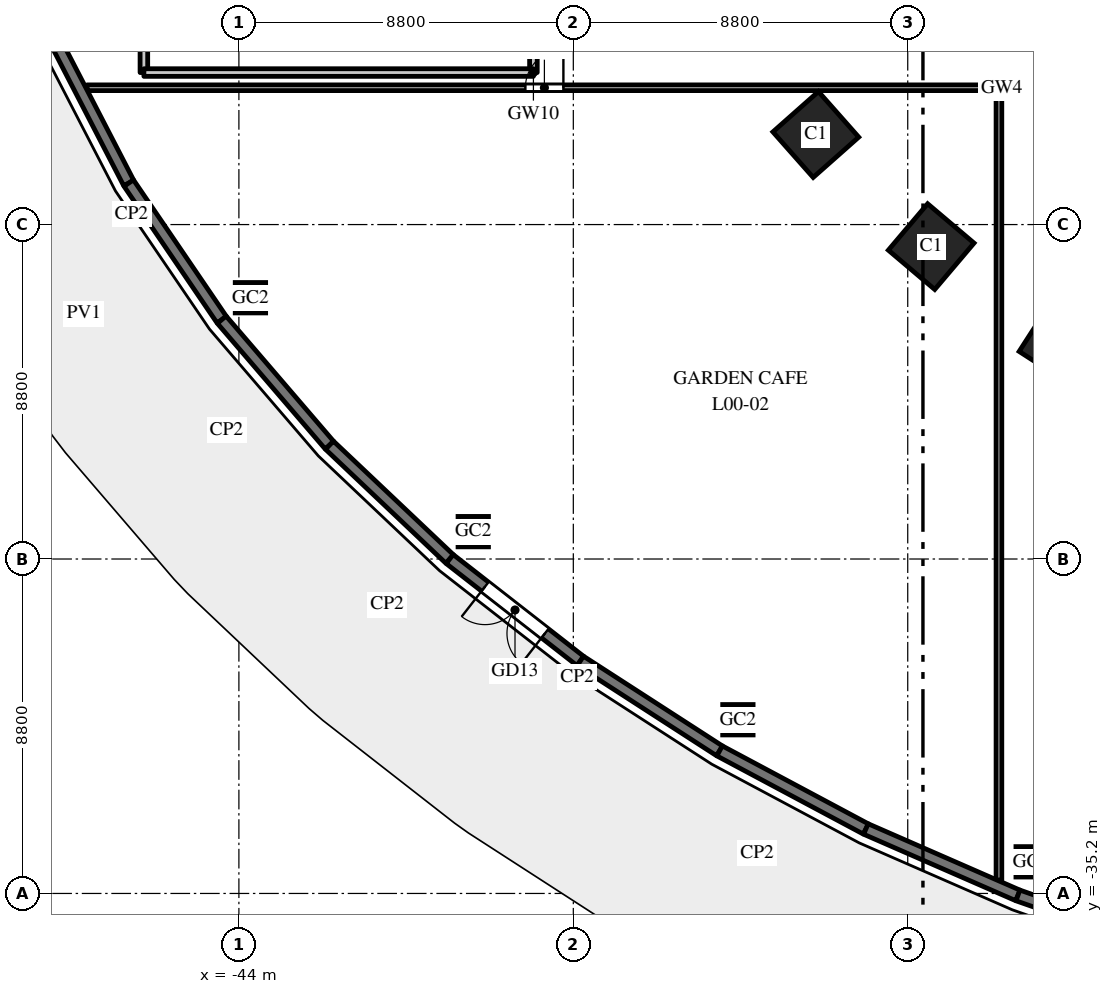
"""IFC4 building model, lengths in metres.
Left out: names, types, materials, properties, quantities, classifications, styles, units other than length and angle.
Written with IfcOpenShell. Run it as: python <this file> out.ifc"""

import sys

from ifc_helpers import new_model, si_unit, direction, frame, frame_2d, origin, origin_2d, place, context, subcontext, project, spatial, rectangle, hollow_rectangle, i_section, extrude, element, fill, save


model = new_model("IFC4")
c1 = context("Model", 3, precision=1e-05, world=origin(), true_north=direction((0.0, 1.0)))
c2 = subcontext(c1, "Body", "Model", "MODEL_VIEW")
j1 = project(units=[si_unit("LENGTHUNIT", "METRE"), si_unit("PLANEANGLEUNIT", "RADIAN")], contexts=[c1])
p1 = place(None, origin())
s1 = spatial("IfcSite", under=j1, at=p1, CompositionType="ELEMENT")
p2 = place(p1, origin())
s2 = spatial("IfcBuilding", under=s1, at=p2, CompositionType="ELEMENT")
p3 = place(p2, origin())
s3 = spatial("IfcBuildingStorey", under=s2, at=p3, CompositionType="ELEMENT", Elevation=0.0)
for number, where, z_axis, x_axis in (
    (1, (-28.819, -15.23, 0.0), (0.0, 0.0, 1.0), (0.663, -0.749, 0.0)),
    (2, (-25.783, -18.18, 0.0), (0.0, 0.0, 1.0), (0.763, -0.646, 0.0)),
    (3, (-22.362, -20.7, 0.0), (0.0, 0.0, 1.0), (0.84, -0.542, 0.0)),
):
    element("IfcColumn", number, at=place(p3, frame(where, z_axis=z_axis, x_axis=x_axis)), inside=s3, PredefinedType="COLUMN", context=c2, shape_type="SweptSolid", body=[
        extrude(rectangle(XDim=1.6, YDim=1.6, at=origin_2d()), origin(), (0.0, 0.0, 1.0), 7.5),
    ])
for number, where, z_axis, x_axis in (
    (4, (-43.696, -19.525, 0.0), (0.0, 0.0, 1.0), (1.0, 0.0, 0.0)),
    (5, (-37.833, -25.68, 0.0), (0.0, 0.0, 1.0), (1.0, 0.0, 0.0)),
    (6, (-30.869, -30.629, 0.0), (0.0, 0.0, 1.0), (1.0, 0.0, 0.0)),
    (7, (-23.153, -34.368, 0.0), (0.0, 0.0, 1.0), (1.0, 0.0, 0.0)),
):
    element("IfcColumn", number, at=place(p3, frame(where, z_axis=z_axis, x_axis=x_axis)), inside=s3, PredefinedType="COLUMN", context=c2, shape_type="SweptSolid", body=[
        extrude(hollow_rectangle(XDim=0.8, YDim=0.8, WallThickness=0.04, at=origin_2d()), origin(), (0.0, 0.0, 1.0), 7.5),
    ])
p4 = place(p3, frame((-47.997, -14.0, 0.0), z_axis=(0.0, 0.0, 1.0), x_axis=(1.0, 0.0, 0.0)))
e8 = element("IfcWall", 8, at=p4, inside=s3, PredefinedType="PARTITIONING", context=c2, shape_type="SweptSolid", body=[
    extrude(rectangle(XDim=24.072, YDim=0.15, at=frame_2d((12.036, 0.0))), origin(), (0.0, 0.0, 1.0), 6.25),
])
p5 = place(p4, frame((11.536, 0.0, 0.0)))
e9 = element("IfcOpeningElement", 9, at=p5, cuts=e8, PredefinedType="OPENING", context=c2, shape_type="SweptSolid", body=[
    extrude(rectangle(XDim=1.0, YDim=2.1, at=frame_2d((0.5, 1.05))), frame((0.0, 0.085, 0.0), z_axis=(0.0, -1.0, 0.0), x_axis=(1.0, 0.0, 0.0)), (0.0, 0.0, 1.0), 0.17),
])
p6 = place(p3, frame((-24.0, -14.075, 0.0), z_axis=(0.0, 0.0, 1.0), x_axis=(0.0, -1.0, 0.0)))
e10 = element("IfcWall", 10, at=p6, inside=s3, PredefinedType="PARTITIONING", context=c2, shape_type="SweptSolid", body=[
    extrude(rectangle(XDim=20.776, YDim=0.15, at=frame_2d((10.388, 0.0))), origin(), (0.0, 0.0, 1.0), 6.2),
])
p7 = place(p3, frame((-48.894, -12.649, 0.0), z_axis=(0.0, 0.0, 1.0), x_axis=(0.459242531468, -0.888310923771, 0.0)))
e11 = element("IfcWall", 11, at=p7, inside=s3, PredefinedType="SOLIDWALL", context=c2, shape_type="SweptSolid", body=[
    extrude(rectangle(XDim=4.345, YDim=0.3, at=frame_2d((2.172, 0.0))), origin(), (0.0, 0.0, 1.0), 7.25),
])
p8 = place(p7, frame((0.673, 0.0, 0.0)))
e12 = element("IfcOpeningElement", 12, at=p8, cuts=e11, PredefinedType="OPENING", context=c2, shape_type="SweptSolid", body=[
    extrude(rectangle(XDim=3.0, YDim=3.6, at=frame_2d((1.5, 1.8))), frame((0.0, 0.16, 0.0), z_axis=(0.0, -1.0, 0.0), x_axis=(1.0, 0.0, 0.0)), (0.0, 0.0, 1.0), 0.32),
])
p9 = place(p3, frame((-46.899, -16.508, 0.0), z_axis=(0.0, 0.0, 1.0), x_axis=(0.562667738859, -0.82668314102, 0.0)))
e13 = element("IfcWall", 13, at=p9, inside=s3, PredefinedType="SOLIDWALL", context=c2, shape_type="SweptSolid", body=[
    extrude(rectangle(XDim=4.349, YDim=0.3, at=frame_2d((2.174, 0.0))), origin(), (0.0, 0.0, 1.0), 7.25),
])
p10 = place(p9, frame((0.674, 0.0, 0.0)))
e14 = element("IfcOpeningElement", 14, at=p10, cuts=e13, PredefinedType="OPENING", context=c2, shape_type="SweptSolid", body=[
    extrude(rectangle(XDim=3.0, YDim=3.6, at=frame_2d((1.5, 1.8))), frame((0.0, 0.16, 0.0), z_axis=(0.0, -1.0, 0.0), x_axis=(1.0, 0.0, 0.0)), (0.0, 0.0, 1.0), 0.32),
])
p11 = place(p3, frame((-44.452, -20.104, 0.0), z_axis=(0.0, 0.0, 1.0), x_axis=(0.651387059497, -0.758745608699, 0.0)))
e15 = element("IfcWall", 15, at=p11, inside=s3, PredefinedType="SOLIDWALL", context=c2, shape_type="SweptSolid", body=[
    extrude(rectangle(XDim=4.353, YDim=0.3, at=frame_2d((2.176, 0.0))), origin(), (0.0, 0.0, 1.0), 7.25),
])
p12 = place(p11, frame((0.676, 0.0, 0.0)))
e16 = element("IfcOpeningElement", 16, at=p12, cuts=e15, PredefinedType="OPENING", context=c2, shape_type="SweptSolid", body=[
    extrude(rectangle(XDim=3.0, YDim=3.6, at=frame_2d((1.5, 1.8))), frame((0.0, 0.16, 0.0), z_axis=(0.0, -1.0, 0.0), x_axis=(1.0, 0.0, 0.0)), (0.0, 0.0, 1.0), 0.32),
])
p13 = place(p3, frame((-41.617, -23.406, 0.0), z_axis=(0.0, 0.0, 1.0), x_axis=(0.72620446032, -0.687478786444, 0.0)))
e17 = element("IfcWall", 17, at=p13, inside=s3, PredefinedType="SOLIDWALL", context=c2, shape_type="SweptSolid", body=[
    extrude(rectangle(XDim=4.356, YDim=0.3, at=frame_2d((2.178, 0.0))), origin(), (0.0, 0.0, 1.0), 7.25),
])
p14 = place(p13, frame((0.678, 0.0, 0.0)))
e18 = element("IfcOpeningElement", 18, at=p14, cuts=e17, PredefinedType="OPENING", context=c2, shape_type="SweptSolid", body=[
    extrude(rectangle(XDim=3.0, YDim=3.6, at=frame_2d((1.5, 1.8))), frame((0.0, 0.16, 0.0), z_axis=(0.0, -1.0, 0.0), x_axis=(1.0, 0.0, 0.0)), (0.0, 0.0, 1.0), 0.32),
])
p15 = place(p3, frame((-38.453, -26.401, 0.0), z_axis=(0.0, 0.0, 1.0), x_axis=(0.788491985196, -0.615045030288, 0.0)))
e19 = element("IfcWall", 19, at=p15, inside=s3, PredefinedType="SOLIDWALL", context=c2, shape_type="SweptSolid", body=[
    extrude(rectangle(XDim=4.359, YDim=0.3, at=frame_2d((2.18, 0.0))), origin(), (0.0, 0.0, 1.0), 7.25),
])
p16 = place(p15, frame((1.18, 0.0, 0.0)))
e20 = element("IfcOpeningElement", 20, at=p16, cuts=e19, PredefinedType="OPENING", context=c2, shape_type="SweptSolid", body=[
    extrude(rectangle(XDim=2.0, YDim=2.4, at=frame_2d((1.0, 1.2))), frame((0.0, 0.16, 0.0), z_axis=(0.0, -1.0, 0.0), x_axis=(1.0, 0.0, 0.0)), (0.0, 0.0, 1.0), 0.32),
])
p17 = place(p3, frame((-35.016, -29.082, 0.0), z_axis=(0.0, 0.0, 1.0), x_axis=(0.840047348843, -0.542513088969, 0.0)))
e21 = element("IfcWall", 21, at=p17, inside=s3, PredefinedType="SOLIDWALL", context=c2, shape_type="SweptSolid", body=[
    extrude(rectangle(XDim=4.362, YDim=0.3, at=frame_2d((2.181, 0.0))), origin(), (0.0, 0.0, 1.0), 7.25),
])
p18 = place(p17, frame((0.681, 0.0, 0.0)))
e22 = element("IfcOpeningElement", 22, at=p18, cuts=e21, PredefinedType="OPENING", context=c2, shape_type="SweptSolid", body=[
    extrude(rectangle(XDim=3.0, YDim=3.6, at=frame_2d((1.5, 1.8))), frame((0.0, 0.16, 0.0), z_axis=(0.0, -1.0, 0.0), x_axis=(1.0, 0.0, 0.0)), (0.0, 0.0, 1.0), 0.32),
])
p19 = place(p3, frame((-31.352, -31.448, 0.0), z_axis=(0.0, 0.0, 1.0), x_axis=(0.882159305704, -0.47095112205, 0.0)))
e23 = element("IfcWall", 23, at=p19, inside=s3, PredefinedType="SOLIDWALL", context=c2, shape_type="SweptSolid", body=[
    extrude(rectangle(XDim=4.365, YDim=0.3, at=frame_2d((2.182, 0.0))), origin(), (0.0, 0.0, 1.0), 7.25),
])
p20 = place(p19, frame((0.682, 0.0, 0.0)))
e24 = element("IfcOpeningElement", 24, at=p20, cuts=e23, PredefinedType="OPENING", context=c2, shape_type="SweptSolid", body=[
    extrude(rectangle(XDim=3.0, YDim=3.6, at=frame_2d((1.5, 1.8))), frame((0.0, 0.16, 0.0), z_axis=(0.0, -1.0, 0.0), x_axis=(1.0, 0.0, 0.0)), (0.0, 0.0, 1.0), 0.32),
])
p21 = place(p3, frame((-27.501, -33.504, 0.0), z_axis=(0.0, 0.0, 1.0), x_axis=(0.916336904548, -0.400408138483, 0.0)))
e25 = element("IfcWall", 25, at=p21, inside=s3, PredefinedType="SOLIDWALL", context=c2, shape_type="SweptSolid", body=[
    extrude(rectangle(XDim=4.366, YDim=0.3, at=frame_2d((2.183, 0.0))), origin(), (0.0, 0.0, 1.0), 7.25),
])
p22 = place(p21, frame((0.563, 0.0, 0.0)))
e26 = element("IfcOpeningElement", 26, at=p22, cuts=e25, PredefinedType="OPENING", context=c2, shape_type="SweptSolid", body=[
    extrude(rectangle(XDim=3.0, YDim=3.6, at=frame_2d((1.5, 1.8))), frame((0.0, 0.16, 0.0), z_axis=(0.0, -1.0, 0.0), x_axis=(1.0, 0.0, 0.0)), (0.0, 0.0, 1.0), 0.32),
])
p23 = place(p3, frame((-23.5, -35.252, 0.0), z_axis=(0.0, 0.0, 1.0), x_axis=(0.943526738033, -0.331296384853, 0.0)))
e27 = element("IfcWall", 27, at=p23, inside=s3, PredefinedType="SOLIDWALL", context=c2, shape_type="SweptSolid", body=[
    extrude(rectangle(XDim=4.368, YDim=0.3, at=frame_2d((2.184, 0.0))), origin(), (0.0, 0.0, 1.0), 7.25),
])
p24 = place(p23, frame((1.184, 0.0, 0.0)))
e28 = element("IfcOpeningElement", 28, at=p24, cuts=e27, PredefinedType="OPENING", context=c2, shape_type="SweptSolid", body=[
    extrude(rectangle(XDim=2.0, YDim=2.4, at=frame_2d((1.0, 1.2))), frame((0.0, 0.16, 0.0), z_axis=(0.0, -1.0, 0.0), x_axis=(1.0, 0.0, 0.0)), (0.0, 0.0, 1.0), 0.32),
])
p25 = place(p3, frame((-46.5, -13.6, 0.0), z_axis=(0.0, 0.0, 1.0), x_axis=(0.0, 1.0, 0.0)))
e29 = element("IfcWall", 29, at=p25, inside=s3, PredefinedType="PARTITIONING", context=c2, shape_type="SweptSolid", body=[
    extrude(rectangle(XDim=1.9, YDim=0.2, at=frame_2d((0.95, 0.0))), origin(), (0.0, 0.0, 1.0), 6.25),
])
p26 = place(p3, frame((-36.25, -11.3, 0.0), z_axis=(0.0, 0.0, 1.0), x_axis=(0.0, -1.0, 0.0)))
e30 = element("IfcWall", 30, at=p26, inside=s3, PredefinedType="PARTITIONING", context=c2, shape_type="SweptSolid", body=[
    extrude(rectangle(XDim=2.3, YDim=0.2, at=frame_2d((1.15, 0.0))), origin(), (0.0, 0.0, 1.0), 7.25),
])
p27 = place(p3, frame((-36.25, -13.6, 0.0), z_axis=(0.0, 0.0, 1.0), x_axis=(-1.0, 0.0, 0.0)))
e31 = element("IfcWall", 31, at=p27, inside=s3, PredefinedType="PARTITIONING", context=c2, shape_type="SweptSolid", body=[
    extrude(rectangle(XDim=10.25, YDim=0.2, at=frame_2d((5.125, 0.0))), origin(), (0.0, 0.0, 1.0), 6.75),
])
for number, where, z_axis, x_axis in (
    (32, (-46.825, -17.327, -0.15), (0.0, 0.0, 1.0), (1.0, 0.0, 0.0)),
    (33, (-44.325, -23.014, -0.15), (0.0, 0.0, 1.0), (1.0, 0.0, 0.0)),
    (34, (-40.099, -27.597, -0.15), (0.0, 0.0, 1.0), (1.0, 0.0, 0.0)),
    (35, (-35.099, -29.504, -0.15), (0.0, 0.0, 1.0), (1.0, 0.0, 0.0)),
    (36, (-30.364, -34.129, -0.15), (0.0, 0.0, 1.0), (1.0, 0.0, 0.0)),
):
    element("IfcColumn", number, at=place(p3, frame(where, z_axis=z_axis, x_axis=x_axis)), inside=s3, PredefinedType="COLUMN", context=c2, shape_type="SweptSolid", body=[
        extrude(i_section(OverallWidth=0.3, OverallDepth=0.3, WebThickness=0.011, FlangeThickness=0.019, FilletRadius=0.027, at=origin_2d()), origin(), (0.0, 0.0, 1.0), 12.3),
    ])
p28 = place(p5, origin())
e37 = element("IfcDoor", 37, at=p28, inside=s3, OperationType="SINGLE_SWING_RIGHT", PredefinedType="DOOR", context=c2, shape_type="SweptSolid", body=[
    extrude(rectangle(XDim=1.0, YDim=2.1, at=frame_2d((0.5, 1.05))), frame((0.0, 0.025, 0.0), z_axis=(0.0, -1.0, 0.0), x_axis=(1.0, 0.0, 0.0)), (0.0, 0.0, 1.0), 0.05),
])
fill(e9, e37)
p29 = place(p8, origin())
e38 = element("IfcWindow", 38, at=p29, inside=s3, PartitioningType="SINGLE_PANEL", PredefinedType="WINDOW", context=c2, shape_type="SweptSolid", body=[
    extrude(rectangle(XDim=3.0, YDim=3.6, at=frame_2d((1.5, 1.8))), frame((0.0, 0.03, 0.0), z_axis=(0.0, -1.0, 0.0), x_axis=(1.0, 0.0, 0.0)), (0.0, 0.0, 1.0), 0.06),
])
fill(e12, e38)
p30 = place(p10, origin())
e39 = element("IfcWindow", 39, at=p30, inside=s3, PartitioningType="SINGLE_PANEL", PredefinedType="WINDOW", context=c2, shape_type="SweptSolid", body=[
    extrude(rectangle(XDim=3.0, YDim=3.6, at=frame_2d((1.5, 1.8))), frame((0.0, 0.03, 0.0), z_axis=(0.0, -1.0, 0.0), x_axis=(1.0, 0.0, 0.0)), (0.0, 0.0, 1.0), 0.06),
])
fill(e14, e39)
p31 = place(p12, origin())
e40 = element("IfcWindow", 40, at=p31, inside=s3, PartitioningType="SINGLE_PANEL", PredefinedType="WINDOW", context=c2, shape_type="SweptSolid", body=[
    extrude(rectangle(XDim=3.0, YDim=3.6, at=frame_2d((1.5, 1.8))), frame((0.0, 0.03, 0.0), z_axis=(0.0, -1.0, 0.0), x_axis=(1.0, 0.0, 0.0)), (0.0, 0.0, 1.0), 0.06),
])
fill(e16, e40)
p32 = place(p14, origin())
e41 = element("IfcWindow", 41, at=p32, inside=s3, PartitioningType="SINGLE_PANEL", PredefinedType="WINDOW", context=c2, shape_type="SweptSolid", body=[
    extrude(rectangle(XDim=3.0, YDim=3.6, at=frame_2d((1.5, 1.8))), frame((0.0, 0.03, 0.0), z_axis=(0.0, -1.0, 0.0), x_axis=(1.0, 0.0, 0.0)), (0.0, 0.0, 1.0), 0.06),
])
fill(e18, e41)
p33 = place(p16, frame((2.0, 0.0, 0.0), z_axis=(0.0, 0.0, 1.0), x_axis=(-1.0, 0.0, 0.0)))
e42 = element("IfcDoor", 42, at=p33, inside=s3, OperationType="DOUBLE_DOOR_SINGLE_SWING", PredefinedType="DOOR", context=c2, shape_type="SweptSolid", body=[
    extrude(rectangle(XDim=2.0, YDim=2.4, at=frame_2d((1.0, 1.2))), frame((0.0, 0.025, 0.0), z_axis=(0.0, -1.0, 0.0), x_axis=(1.0, 0.0, 0.0)), (0.0, 0.0, 1.0), 0.05),
])
fill(e20, e42)
p34 = place(p18, origin())
e43 = element("IfcWindow", 43, at=p34, inside=s3, PartitioningType="SINGLE_PANEL", PredefinedType="WINDOW", context=c2, shape_type="SweptSolid", body=[
    extrude(rectangle(XDim=3.0, YDim=3.6, at=frame_2d((1.5, 1.8))), frame((0.0, 0.03, 0.0), z_axis=(0.0, -1.0, 0.0), x_axis=(1.0, 0.0, 0.0)), (0.0, 0.0, 1.0), 0.06),
])
fill(e22, e43)
p35 = place(p20, origin())
e44 = element("IfcWindow", 44, at=p35, inside=s3, PartitioningType="SINGLE_PANEL", PredefinedType="WINDOW", context=c2, shape_type="SweptSolid", body=[
    extrude(rectangle(XDim=3.0, YDim=3.6, at=frame_2d((1.5, 1.8))), frame((0.0, 0.03, 0.0), z_axis=(0.0, -1.0, 0.0), x_axis=(1.0, 0.0, 0.0)), (0.0, 0.0, 1.0), 0.06),
])
fill(e24, e44)
p36 = place(p22, origin())
e45 = element("IfcWindow", 45, at=p36, inside=s3, PartitioningType="SINGLE_PANEL", PredefinedType="WINDOW", context=c2, shape_type="SweptSolid", body=[
    extrude(rectangle(XDim=3.0, YDim=3.6, at=frame_2d((1.5, 1.8))), frame((0.0, 0.03, 0.0), z_axis=(0.0, -1.0, 0.0), x_axis=(1.0, 0.0, 0.0)), (0.0, 0.0, 1.0), 0.06),
])
fill(e26, e45)
save(model, sys.argv[1])
